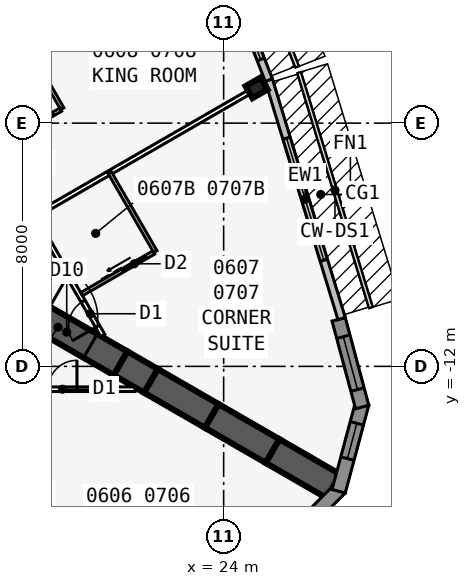
"""IFC4 building model, lengths in metres.
Left out: names, types, materials, properties, quantities, classifications, styles, units other than length and angle.
Written with IfcOpenShell. Run it as: python <this file> out.ifc"""

import sys

from ifc_helpers import new_model, si_unit, direction, frame, frame_2d, origin, origin_2d, place, context, subcontext, project, spatial, polyline, rectangle, i_section, outline, extrude, element, fill, save


model = new_model("IFC4")
c1 = context("Model", 3, precision=1e-05, world=origin(), true_north=direction((0.0, 1.0)))
c2 = subcontext(c1, "Body", "Model", "MODEL_VIEW")
j1 = project(units=[si_unit("LENGTHUNIT", "METRE"), si_unit("PLANEANGLEUNIT", "RADIAN")], contexts=[c1])
p1 = place(None, origin())
s1 = spatial("IfcSite", under=j1, at=p1, CompositionType="ELEMENT")
p2 = place(p1, origin())
s2 = spatial("IfcBuilding", under=s1, at=p2, CompositionType="ELEMENT")
p3 = place(p2, frame((0.0, 0.0, 31.9)))
s3 = spatial("IfcBuildingStorey", under=s2, at=p3, CompositionType="ELEMENT", Elevation=31.9)
p4 = place(p3, frame((16.5, -9.526, 0.0), z_axis=(0.0, 0.0, 1.0), x_axis=(0.866031398331, -0.499989616998, 0.0)))
e1 = element("IfcWall", 1, at=p4, inside=s3, PredefinedType="SHEAR", context=c2, shape_type="SweptSolid", body=[
    extrude(rectangle(XDim=4.746, YDim=0.9, at=frame_2d((2.373, 0.0))), origin(), (0.0, 0.0, 1.0), 3.4),
])
p5 = place(p4, frame((1.8, 0.0, 0.0)))
e2 = element("IfcOpeningElement", 2, at=p5, cuts=e1, PredefinedType="OPENING", context=c2, shape_type="SweptSolid", body=[
    extrude(rectangle(XDim=1.8, YDim=2.13, at=frame_2d((0.9, 1.065))), frame((0.0, 0.46, 0.0), z_axis=(0.0, -1.0, 0.0), x_axis=(1.0, 0.0, 0.0)), (0.0, 0.0, 1.0), 0.92),
])
p6 = place(p3, frame((20.61, -11.899, 0.0), z_axis=(0.0, 0.0, 1.0), x_axis=(0.866009537788, -0.500027479704, 0.0)))
e3 = element("IfcWall", 3, at=p6, inside=s3, PredefinedType="SHEAR", context=c2, shape_type="SweptSolid", body=[
    extrude(rectangle(XDim=1.155, YDim=0.9, at=frame_2d((0.577, 0.0))), origin(), (0.0, 0.0, 1.0), 3.4),
])
for number, where, z_axis, x_axis in (
    (4, (21.61, -12.477, 0.0), (0.0, 0.0, 1.0), (0.866, -0.5, 0.0)),
    (5, (23.61, -13.631, 0.0), (0.0, 0.0, 1.0), (0.866, -0.5, 0.0)),
    (6, (25.61, -14.786, 0.0), (0.0, 0.0, 1.0), (0.866, -0.5, 0.0)),
):
    element("IfcWall", number, at=place(p3, frame(where, z_axis=z_axis, x_axis=x_axis)), inside=s3, PredefinedType="SHEAR", context=c2, shape_type="SweptSolid", body=[
        extrude(rectangle(XDim=2.309, YDim=0.9, at=frame_2d((1.155, 0.0))), origin(), (0.0, 0.0, 1.0), 3.4),
    ])
p7 = place(p3, frame((25.083, -2.839, 0.0), z_axis=(0.0, 0.0, 1.0), x_axis=(-0.5, 0.866025403784, 0.0)))
e7 = element("IfcColumn", 7, at=p7, inside=s3, PredefinedType="COLUMN", context=c2, shape_type="SweptSolid", body=[
    extrude(i_section(OverallWidth=0.455, OverallDepth=0.569, WebThickness=0.078, FlangeThickness=0.125, at=origin_2d()), origin(), (0.0, 0.0, 1.0), 3.4),
])
p8 = place(p3, frame((25.728, -18.12, 0.0), z_axis=(0.0, 0.0, 1.0), x_axis=(0.707025086683, 0.707188466253, 0.0)))
e8 = element("IfcWall", 8, at=p8, inside=s3, PredefinedType="SOLIDWALL", context=c2, shape_type="SweptSolid", body=[
    extrude(outline(polyline([(2.989, 0.225), (2.93, 0.225), (2.438, 0.093), (2.402, 0.225), (0.0, 0.225), (0.0, -0.225), (2.989, -0.225), (2.989, 0.225)])), origin(), (0.0, 0.0, 1.0), 3.235),
])
p9 = place(p8, frame((0.676, 0.0, 0.45)))
e9 = element("IfcOpeningElement", 9, at=p9, cuts=e8, PredefinedType="OPENING", context=c2, shape_type="SweptSolid", body=[
    extrude(rectangle(XDim=1.2, YDim=2.4, at=frame_2d((0.6, 1.2))), frame((0.0, 0.235, 0.0), z_axis=(0.0, -1.0, 0.0), x_axis=(1.0, 0.0, 0.0)), (0.0, 0.0, 1.0), 0.47),
])
p10 = place(p3, frame((27.783, -16.108, 0.0), z_axis=(0.0, 0.0, 1.0), x_axis=(0.258801419081, 0.965930548995, 0.0)))
e10 = element("IfcWall", 10, at=p10, inside=s3, PredefinedType="SOLIDWALL", context=c2, shape_type="SweptSolid", body=[
    extrude(outline(polyline([(2.989, 0.225), (0.586, 0.225), (0.551, 0.093), (0.06, 0.225), (0.0, 0.225), (0.0, -0.225), (2.989, -0.225), (2.989, 0.225)])), origin(), (0.0, 0.0, 1.0), 3.235),
])
p11 = place(p10, frame((1.113, 0.0, 0.45)))
e11 = element("IfcOpeningElement", 11, at=p11, cuts=e10, PredefinedType="OPENING", context=c2, shape_type="SweptSolid", body=[
    extrude(rectangle(XDim=1.2, YDim=2.4, at=frame_2d((0.6, 1.2))), frame((0.0, 0.235, 0.0), z_axis=(0.0, -1.0, 0.0), x_axis=(1.0, 0.0, 0.0)), (0.0, 0.0, 1.0), 0.47),
])
p12 = place(p3, frame((28.556, -13.337, 0.0), z_axis=(0.0, 0.0, 1.0), x_axis=(-0.258780998834, 0.965936019953, 0.0)))
e12 = element("IfcWall", 12, at=p12, inside=s3, PredefinedType="SOLIDWALL", context=c2, shape_type="SweptSolid", body=[
    extrude(rectangle(XDim=2.989, YDim=0.45, at=frame_2d((1.494, 0.0))), origin(), (0.0, 0.0, 1.0), 3.235),
])
p13 = place(p12, frame((0.594, 0.0, 0.45)))
e13 = element("IfcOpeningElement", 13, at=p13, cuts=e12, PredefinedType="OPENING", context=c2, shape_type="SweptSolid", body=[
    extrude(rectangle(XDim=1.8, YDim=2.4, at=frame_2d((0.9, 1.2))), frame((0.0, 0.235, 0.0), z_axis=(0.0, -1.0, 0.0), x_axis=(1.0, 0.0, 0.0)), (0.0, 0.0, 1.0), 0.47),
])
p14 = place(p3, frame((27.88, -10.429, 0.0), z_axis=(0.0, 0.0, 1.0), x_axis=(-0.2919790669, 0.956424709265, 0.0)))
e14 = element("IfcWall", 14, at=p14, inside=s3, PredefinedType="STANDARD", context=c2, shape_type="SweptSolid", body=[
    extrude(rectangle(XDim=8.211, YDim=0.25, at=frame_2d((4.105, 0.0))), origin(), (0.0, 0.0, 1.0), 3.235),
])
p15 = place(p14, frame((2.006, 0.0, 0.45)))
e15 = element("IfcOpeningElement", 15, at=p15, cuts=e14, PredefinedType="OPENING", context=c2, shape_type="SweptSolid", body=[
    extrude(rectangle(XDim=4.2, YDim=2.4, at=frame_2d((2.1, 1.2))), frame((0.0, 0.135, 0.0), z_axis=(0.0, -1.0, 0.0), x_axis=(1.0, 0.0, 0.0)), (0.0, 0.0, 1.0), 0.27),
])
p16 = place(p3, frame((25.486, -2.584, 0.0), z_axis=(0.0, 0.0, 1.0), x_axis=(-0.364013463868, 0.931393685894, 0.0)))
e16 = element("IfcWall", 16, at=p16, inside=s3, PredefinedType="STANDARD", context=c2, shape_type="SweptSolid", body=[
    extrude(rectangle(XDim=5.058, YDim=0.25, at=frame_2d((2.529, 0.0))), origin(), (0.0, 0.0, 1.0), 3.235),
])
p17 = place(p16, frame((0.729, 0.0, 0.45)))
e17 = element("IfcOpeningElement", 17, at=p17, cuts=e16, PredefinedType="OPENING", context=c2, shape_type="SweptSolid", body=[
    extrude(rectangle(XDim=3.6, YDim=2.4, at=frame_2d((1.8, 1.2))), frame((0.0, 0.135, 0.0), z_axis=(0.0, -1.0, 0.0), x_axis=(1.0, 0.0, 0.0)), (0.0, 0.0, 1.0), 0.27),
])
p18 = place(p3, frame((-21.086, -12.751, 0.0), z_axis=(0.0, 0.0, 1.0), x_axis=(1.0, 0.0, 0.0)))
e18 = element("IfcWall", 18, at=p18, inside=s3, PredefinedType="PARTITIONING", context=c2, shape_type="SweptSolid", body=[
    extrude(rectangle(XDim=42.172, YDim=0.15, at=frame_2d((21.086, 0.0))), origin(), (0.0, 0.0, 1.0), 3.235),
])
p19 = place(p18, frame((2.338, 0.0, 0.0)))
e19 = element("IfcOpeningElement", 19, at=p19, cuts=e18, PredefinedType="OPENING", context=c2, shape_type="SweptSolid", body=[
    extrude(rectangle(XDim=0.95, YDim=2.13, at=frame_2d((0.475, 1.065))), frame((0.0, 0.085, 0.0), z_axis=(0.0, -1.0, 0.0), x_axis=(1.0, 0.0, 0.0)), (0.0, 0.0, 1.0), 0.17),
])
p20 = place(p18, frame((12.511, 0.0, 0.0)))
e20 = element("IfcOpeningElement", 20, at=p20, cuts=e18, PredefinedType="OPENING", context=c2, shape_type="SweptSolid", body=[
    extrude(rectangle(XDim=0.95, YDim=2.13, at=frame_2d((0.475, 1.065))), frame((0.0, 0.085, 0.0), z_axis=(0.0, -1.0, 0.0), x_axis=(1.0, 0.0, 0.0)), (0.0, 0.0, 1.0), 0.17),
])
p21 = place(p18, frame((18.711, 0.0, 0.0)))
e21 = element("IfcOpeningElement", 21, at=p21, cuts=e18, PredefinedType="OPENING", context=c2, shape_type="SweptSolid", body=[
    extrude(rectangle(XDim=0.95, YDim=2.13, at=frame_2d((0.475, 1.065))), frame((0.0, 0.085, 0.0), z_axis=(0.0, -1.0, 0.0), x_axis=(1.0, 0.0, 0.0)), (0.0, 0.0, 1.0), 0.17),
])
p22 = place(p18, frame((23.086, 0.0, 0.0)))
e22 = element("IfcOpeningElement", 22, at=p22, cuts=e18, PredefinedType="OPENING", context=c2, shape_type="SweptSolid", body=[
    extrude(rectangle(XDim=1.0, YDim=2.13, at=frame_2d((0.5, 1.065))), frame((0.0, 0.085, 0.0), z_axis=(0.0, -1.0, 0.0), x_axis=(1.0, 0.0, 0.0)), (0.0, 0.0, 1.0), 0.17),
])
p23 = place(p18, frame((27.511, 0.0, 0.0)))
e23 = element("IfcOpeningElement", 23, at=p23, cuts=e18, PredefinedType="OPENING", context=c2, shape_type="SweptSolid", body=[
    extrude(rectangle(XDim=0.95, YDim=2.13, at=frame_2d((0.475, 1.065))), frame((0.0, 0.085, 0.0), z_axis=(0.0, -1.0, 0.0), x_axis=(1.0, 0.0, 0.0)), (0.0, 0.0, 1.0), 0.17),
])
p24 = place(p18, frame((34.311, 0.0, 0.0)))
e24 = element("IfcOpeningElement", 24, at=p24, cuts=e18, PredefinedType="OPENING", context=c2, shape_type="SweptSolid", body=[
    extrude(rectangle(XDim=0.95, YDim=2.13, at=frame_2d((0.475, 1.065))), frame((0.0, 0.085, 0.0), z_axis=(0.0, -1.0, 0.0), x_axis=(1.0, 0.0, 0.0)), (0.0, 0.0, 1.0), 0.17),
])
p25 = place(p18, frame((39.311, 0.0, 0.0)))
e25 = element("IfcOpeningElement", 25, at=p25, cuts=e18, PredefinedType="OPENING", context=c2, shape_type="SweptSolid", body=[
    extrude(rectangle(XDim=0.95, YDim=2.13, at=frame_2d((0.475, 1.065))), frame((0.0, 0.085, 0.0), z_axis=(0.0, -1.0, 0.0), x_axis=(1.0, 0.0, 0.0)), (0.0, 0.0, 1.0), 0.17),
])
p26 = place(p3, frame((20.027, -10.985, 0.0), z_axis=(0.0, 0.0, 1.0), x_axis=(-0.500001677587, 0.866024435227, 0.0)))
e26 = element("IfcWall", 26, at=p26, inside=s3, PredefinedType="PARTITIONING", context=c2, shape_type="SweptSolid", body=[
    extrude(rectangle(XDim=39.054, YDim=0.15, at=frame_2d((19.527, 0.0))), origin(), (0.0, 0.0, 1.0), 3.235),
])
p27 = place(p26, frame((0.352, 0.0, 0.0)))
e27 = element("IfcOpeningElement", 27, at=p27, cuts=e26, PredefinedType="OPENING", context=c2, shape_type="SweptSolid", body=[
    extrude(rectangle(XDim=0.95, YDim=2.13, at=frame_2d((0.475, 1.065))), frame((0.0, 0.085, 0.0), z_axis=(0.0, -1.0, 0.0), x_axis=(1.0, 0.0, 0.0)), (0.0, 0.0, 1.0), 0.17),
])
p28 = place(p26, frame((5.952, 0.0, 0.0)))
e28 = element("IfcOpeningElement", 28, at=p28, cuts=e26, PredefinedType="OPENING", context=c2, shape_type="SweptSolid", body=[
    extrude(rectangle(XDim=0.95, YDim=2.13, at=frame_2d((0.475, 1.065))), frame((0.0, 0.085, 0.0), z_axis=(0.0, -1.0, 0.0), x_axis=(1.0, 0.0, 0.0)), (0.0, 0.0, 1.0), 0.17),
])
p29 = place(p26, frame((12.152, 0.0, 0.0)))
e29 = element("IfcOpeningElement", 29, at=p29, cuts=e26, PredefinedType="OPENING", context=c2, shape_type="SweptSolid", body=[
    extrude(rectangle(XDim=0.95, YDim=2.13, at=frame_2d((0.475, 1.065))), frame((0.0, 0.085, 0.0), z_axis=(0.0, -1.0, 0.0), x_axis=(1.0, 0.0, 0.0)), (0.0, 0.0, 1.0), 0.17),
])
p30 = place(p26, frame((15.952, 0.0, 0.0)))
e30 = element("IfcOpeningElement", 30, at=p30, cuts=e26, PredefinedType="OPENING", context=c2, shape_type="SweptSolid", body=[
    extrude(rectangle(XDim=0.95, YDim=2.13, at=frame_2d((0.475, 1.065))), frame((0.0, 0.085, 0.0), z_axis=(0.0, -1.0, 0.0), x_axis=(1.0, 0.0, 0.0)), (0.0, 0.0, 1.0), 0.17),
])
p31 = place(p26, frame((22.152, 0.0, 0.0)))
e31 = element("IfcOpeningElement", 31, at=p31, cuts=e26, PredefinedType="OPENING", context=c2, shape_type="SweptSolid", body=[
    extrude(rectangle(XDim=0.95, YDim=2.13, at=frame_2d((0.475, 1.065))), frame((0.0, 0.085, 0.0), z_axis=(0.0, -1.0, 0.0), x_axis=(1.0, 0.0, 0.0)), (0.0, 0.0, 1.0), 0.17),
])
p32 = place(p26, frame((25.952, 0.0, 0.0)))
e32 = element("IfcOpeningElement", 32, at=p32, cuts=e26, PredefinedType="OPENING", context=c2, shape_type="SweptSolid", body=[
    extrude(rectangle(XDim=0.95, YDim=2.13, at=frame_2d((0.475, 1.065))), frame((0.0, 0.085, 0.0), z_axis=(0.0, -1.0, 0.0), x_axis=(1.0, 0.0, 0.0)), (0.0, 0.0, 1.0), 0.17),
])
p33 = place(p26, frame((36.546, 0.0, 0.0)))
e33 = element("IfcOpeningElement", 33, at=p33, cuts=e26, PredefinedType="OPENING", context=c2, shape_type="SweptSolid", body=[
    extrude(rectangle(XDim=0.95, YDim=2.13, at=frame_2d((0.475, 1.065))), frame((0.0, 0.085, 0.0), z_axis=(0.0, -1.0, 0.0), x_axis=(1.0, 0.0, 0.0)), (0.0, 0.0, 1.0), 0.17),
])
p34 = place(p3, frame((17.829, -7.027, 0.0), z_axis=(0.0, 0.0, 1.0), x_axis=(0.866032659912, 0.499987431809, 0.0)))
e34 = element("IfcWall", 34, at=p34, inside=s3, PredefinedType="PARTITIONING", context=c2, shape_type="SweptSolid", body=[
    extrude(rectangle(XDim=8.72, YDim=0.15, at=frame_2d((4.36, 0.0))), origin(), (0.0, 0.0, 1.0), 2.389),
])
p35 = place(p3, frame((15.329, -2.697, 0.0), z_axis=(0.0, 0.0, 1.0), x_axis=(0.866018409083, 0.500012114982, 0.0)))
e35 = element("IfcWall", 35, at=p35, inside=s3, PredefinedType="PARTITIONING", context=c2, shape_type="SweptSolid", body=[
    extrude(rectangle(XDim=9.485, YDim=0.15, at=frame_2d((4.742, 0.0))), origin(), (0.0, 0.0, 1.0), 2.389),
])
p36 = place(p3, frame((21.753, -8.225, 0.0), z_axis=(0.0, 0.0, 1.0), x_axis=(-0.499990139034, 0.866031096941, 0.0)))
e36 = element("IfcWall", 36, at=p36, inside=s3, PredefinedType="PLUMBINGWALL", context=c2, shape_type="SweptSolid", body=[
    extrude(rectangle(XDim=3.0, YDim=0.12, at=frame_2d((1.5, 0.0))), origin(), (0.0, 0.0, 1.0), 3.235),
])
p37 = place(p3, frame((19.329, -9.625, 0.0), z_axis=(0.0, 0.0, 1.0), x_axis=(0.866035715982, 0.499982138324, 0.0)))
e37 = element("IfcWall", 37, at=p37, inside=s3, PredefinedType="PLUMBINGWALL", context=c2, shape_type="SweptSolid", body=[
    extrude(rectangle(XDim=2.74, YDim=0.12, at=frame_2d((1.37, 0.0))), origin(), (0.0, 0.0, 1.0), 3.235),
])
p38 = place(p37, frame((1.55, 0.0, 0.0)))
e38 = element("IfcOpeningElement", 38, at=p38, cuts=e37, PredefinedType="OPENING", context=c2, shape_type="SweptSolid", body=[
    extrude(rectangle(XDim=0.9, YDim=2.13, at=frame_2d((0.45, 1.065))), frame((0.0, 0.07, 0.0), z_axis=(0.0, -1.0, 0.0), x_axis=(1.0, 0.0, 0.0)), (0.0, 0.0, 1.0), 0.14),
])
p39 = place(p3, frame((18.694, -3.526, 0.0), z_axis=(0.0, 0.0, 1.0), x_axis=(-0.500033551112, 0.866006032174, 0.0)))
e39 = element("IfcWall", 39, at=p39, inside=s3, PredefinedType="PLUMBINGWALL", context=c2, shape_type="SweptSolid", body=[
    extrude(rectangle(XDim=2.4, YDim=0.12, at=frame_2d((1.2, 0.0))), origin(), (0.0, 0.0, 1.0), 3.235),
])
p40 = place(p3, frame((16.529, -4.776, 0.0), z_axis=(0.0, 0.0, 1.0), x_axis=(0.866023955769, 0.500002508028, 0.0)))
e40 = element("IfcWall", 40, at=p40, inside=s3, PredefinedType="PLUMBINGWALL", context=c2, shape_type="SweptSolid", body=[
    extrude(rectangle(XDim=2.44, YDim=0.12, at=frame_2d((1.22, 0.0))), origin(), (0.0, 0.0, 1.0), 3.235),
])
p41 = place(p40, frame((1.25, 0.0, 0.0)))
e41 = element("IfcOpeningElement", 41, at=p41, cuts=e40, PredefinedType="OPENING", context=c2, shape_type="SweptSolid", body=[
    extrude(rectangle(XDim=0.9, YDim=2.13, at=frame_2d((0.45, 1.065))), frame((0.0, 0.07, 0.0), z_axis=(0.0, -1.0, 0.0), x_axis=(1.0, 0.0, 0.0)), (0.0, 0.0, 1.0), 0.14),
])
p42 = place(p11, origin())
e42 = element("IfcWindow", 42, at=p42, inside=s3, PartitioningType="SINGLE_PANEL", PredefinedType="WINDOW", context=c2, shape_type="SweptSolid", body=[
    extrude(rectangle(XDim=1.2, YDim=2.4, at=frame_2d((0.6, 1.2))), frame((0.0, 0.03, 0.0), z_axis=(0.0, -1.0, 0.0), x_axis=(1.0, 0.0, 0.0)), (0.0, 0.0, 1.0), 0.06),
])
fill(e11, e42)
p43 = place(p13, origin())
e43 = element("IfcWindow", 43, at=p43, inside=s3, PartitioningType="SINGLE_PANEL", PredefinedType="WINDOW", context=c2, shape_type="SweptSolid", body=[
    extrude(rectangle(XDim=1.8, YDim=2.4, at=frame_2d((0.9, 1.2))), frame((0.0, 0.03, 0.0), z_axis=(0.0, -1.0, 0.0), x_axis=(1.0, 0.0, 0.0)), (0.0, 0.0, 1.0), 0.06),
])
fill(e13, e43)
p44 = place(p15, origin())
e44 = element("IfcWindow", 44, at=p44, inside=s3, PartitioningType="SINGLE_PANEL", PredefinedType="WINDOW", context=c2, shape_type="SweptSolid", body=[
    extrude(rectangle(XDim=4.2, YDim=2.4, at=frame_2d((2.1, 1.2))), frame((0.0, 0.03, 0.0), z_axis=(0.0, -1.0, 0.0), x_axis=(1.0, 0.0, 0.0)), (0.0, 0.0, 1.0), 0.06),
])
fill(e15, e44)
p45 = place(p17, origin())
e45 = element("IfcWindow", 45, at=p45, inside=s3, PartitioningType="SINGLE_PANEL", PredefinedType="WINDOW", context=c2, shape_type="SweptSolid", body=[
    extrude(rectangle(XDim=3.6, YDim=2.4, at=frame_2d((1.8, 1.2))), frame((0.0, 0.03, 0.0), z_axis=(0.0, -1.0, 0.0), x_axis=(1.0, 0.0, 0.0)), (0.0, 0.0, 1.0), 0.06),
])
fill(e17, e45)
p46 = place(p25, origin())
e46 = element("IfcDoor", 46, at=p46, inside=s3, OperationType="SINGLE_SWING_RIGHT", PredefinedType="DOOR", context=c2, shape_type="SweptSolid", body=[
    extrude(rectangle(XDim=0.95, YDim=2.13, at=frame_2d((0.475, 1.065))), frame((0.0, 0.025, 0.0), z_axis=(0.0, -1.0, 0.0), x_axis=(1.0, 0.0, 0.0)), (0.0, 0.0, 1.0), 0.05),
])
fill(e25, e46)
p47 = place(p38, origin())
e47 = element("IfcDoor", 47, at=p47, inside=s3, OperationType="SLIDING_TO_LEFT", PredefinedType="DOOR", context=c2, shape_type="SweptSolid", body=[
    extrude(rectangle(XDim=0.9, YDim=2.13, at=frame_2d((0.45, 1.065))), frame((0.0, 0.025, 0.0), z_axis=(0.0, -1.0, 0.0), x_axis=(1.0, 0.0, 0.0)), (0.0, 0.0, 1.0), 0.05),
])
fill(e38, e47)
p48 = place(p27, origin())
e48 = element("IfcDoor", 48, at=p48, inside=s3, OperationType="SINGLE_SWING_LEFT", PredefinedType="DOOR", context=c2, shape_type="SweptSolid", body=[
    extrude(rectangle(XDim=0.95, YDim=2.13, at=frame_2d((0.475, 1.065))), frame((0.0, 0.025, 0.0), z_axis=(0.0, -1.0, 0.0), x_axis=(1.0, 0.0, 0.0)), (0.0, 0.0, 1.0), 0.05),
])
fill(e27, e48)
p49 = place(p41, origin())
e49 = element("IfcDoor", 49, at=p49, inside=s3, OperationType="SLIDING_TO_LEFT", PredefinedType="DOOR", context=c2, shape_type="SweptSolid", body=[
    extrude(rectangle(XDim=0.9, YDim=2.13, at=frame_2d((0.45, 1.065))), frame((0.0, 0.025, 0.0), z_axis=(0.0, -1.0, 0.0), x_axis=(1.0, 0.0, 0.0)), (0.0, 0.0, 1.0), 0.05),
])
fill(e41, e49)
p50 = place(p5, origin())
e50 = element("IfcDoor", 50, at=p50, inside=s3, OperationType="DOUBLE_DOOR_DOUBLE_SWING", PredefinedType="DOOR", context=c2, shape_type="SweptSolid", body=[
    extrude(rectangle(XDim=1.8, YDim=2.13, at=frame_2d((0.9, 1.065))), frame((0.0, 0.025, 0.0), z_axis=(0.0, -1.0, 0.0), x_axis=(1.0, 0.0, 0.0)), (0.0, 0.0, 1.0), 0.05),
])
fill(e2, e50)
save(model, sys.argv[1])
